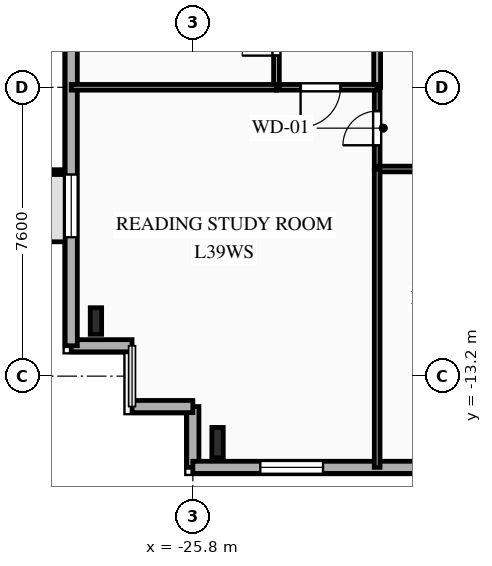
"""IFC4 building model, lengths in metres.
Left out: names, types, materials, properties, quantities, classifications, styles, units other than length and angle.
Written with IfcOpenShell. Run it as: python <this file> out.ifc"""

import sys

from ifc_helpers import new_model, si_unit, direction, frame, frame_2d, origin, origin_2d, place, context, subcontext, project, spatial, rectangle, i_section, extrude, element, fill, save


model = new_model("IFC4")
c1 = context("Model", 3, precision=1e-05, world=origin(), true_north=direction((0.0, 1.0)))
c2 = subcontext(c1, "Body", "Model", "MODEL_VIEW")
j1 = project(units=[si_unit("LENGTHUNIT", "METRE"), si_unit("PLANEANGLEUNIT", "RADIAN")], contexts=[c1])
p1 = place(None, origin())
s1 = spatial("IfcSite", under=j1, at=p1, CompositionType="ELEMENT")
p2 = place(p1, origin())
s2 = spatial("IfcBuilding", under=s1, at=p2, CompositionType="ELEMENT")
p3 = place(p2, frame((0.0, 0.0, 141.05)))
s3 = spatial("IfcBuildingStorey", under=s2, at=p3, CompositionType="ELEMENT", Elevation=141.05)
p4 = place(p3, frame((-25.15, -14.95, 0.0), z_axis=(0.0, 0.0, 1.0), x_axis=(1.0, 0.0, 0.0)))
e1 = element("IfcColumn", 1, at=p4, inside=s3, PredefinedType="COLUMN", context=c2, shape_type="SweptSolid", body=[
    extrude(i_section(OverallWidth=0.3, OverallDepth=0.8, WebThickness=0.018, FlangeThickness=0.033, FilletRadius=0.03, at=origin_2d()), origin(), (0.0, 0.0, 1.0), 3.35),
])
p5 = place(p3, frame((-28.35, -11.75, 0.0), z_axis=(0.0, 0.0, 1.0), x_axis=(1.0, 0.0, 0.0)))
e2 = element("IfcColumn", 2, at=p5, inside=s3, PredefinedType="COLUMN", context=c2, shape_type="SweptSolid", body=[
    extrude(i_section(OverallWidth=0.3, OverallDepth=0.7, WebThickness=0.017, FlangeThickness=0.032, FilletRadius=0.027, at=origin_2d()), origin(), (0.0, 0.0, 1.0), 3.35),
])
p6 = place(p3, frame((-25.8, -15.6, 0.0), z_axis=(0.0, 0.0, 1.0), x_axis=(0.0, 1.0, 0.0)))
e3 = element("IfcWall", 3, at=p6, inside=s3, PredefinedType="SOLIDWALL", context=c2, shape_type="SweptSolid", body=[
    extrude(rectangle(XDim=1.6, YDim=0.32, at=frame_2d((0.8, 0.0))), origin(), (0.0, 0.0, 1.0), 3.04),
])
p7 = place(p3, frame((-25.8, -14.0, 0.0), z_axis=(0.0, 0.0, 1.0), x_axis=(-1.0, 0.0, 0.0)))
e4 = element("IfcWall", 4, at=p7, inside=s3, PredefinedType="SOLIDWALL", context=c2, shape_type="SweptSolid", body=[
    extrude(rectangle(XDim=1.6, YDim=0.32, at=frame_2d((0.8, 0.0))), origin(), (0.0, 0.0, 1.0), 3.04),
])
p8 = place(p3, frame((-27.4, -12.4, 0.0), z_axis=(0.0, 0.0, 1.0), x_axis=(-1.0, 0.0, 0.0)))
e5 = element("IfcWall", 5, at=p8, inside=s3, PredefinedType="SOLIDWALL", context=c2, shape_type="SweptSolid", body=[
    extrude(rectangle(XDim=1.6, YDim=0.32, at=frame_2d((0.8, 0.0))), origin(), (0.0, 0.0, 1.0), 3.04),
])
p9 = place(p3, frame((-29.0, -12.4, 0.0), z_axis=(0.0, 0.0, 1.0), x_axis=(0.0, 1.0, 0.0)))
e6 = element("IfcWall", 6, at=p9, inside=s3, PredefinedType="SOLIDWALL", context=c2, shape_type="SweptSolid", body=[
    extrude(rectangle(XDim=29.6, YDim=0.32, at=frame_2d((14.8, 0.0))), origin(), (0.0, 0.0, 1.0), 3.04),
])
p10 = place(p9, frame((2.855, 0.0, 0.85)))
e7 = element("IfcOpeningElement", 7, at=p10, cuts=e6, PredefinedType="OPENING", context=c2, shape_type="SweptSolid", body=[
    extrude(rectangle(XDim=1.65, YDim=1.85, at=frame_2d((0.825, 0.925))), frame((0.0, 0.17, 0.0), z_axis=(0.0, -1.0, 0.0), x_axis=(1.0, 0.0, 0.0)), (0.0, 0.0, 1.0), 0.34),
])
p11 = place(p9, frame((9.865, 0.0, 0.85)))
e8 = element("IfcOpeningElement", 8, at=p11, cuts=e6, PredefinedType="OPENING", context=c2, shape_type="SweptSolid", body=[
    extrude(rectangle(XDim=1.95, YDim=1.85, at=frame_2d((0.975, 0.925))), frame((0.0, 0.17, 0.0), z_axis=(0.0, -1.0, 0.0), x_axis=(1.0, 0.0, 0.0)), (0.0, 0.0, 1.0), 0.34),
])
p12 = place(p9, frame((13.08, 0.0, 0.85)))
e9 = element("IfcOpeningElement", 9, at=p12, cuts=e6, PredefinedType="OPENING", context=c2, shape_type="SweptSolid", body=[
    extrude(rectangle(XDim=1.6, YDim=1.85, at=frame_2d((0.8, 0.925))), frame((0.0, 0.17, 0.0), z_axis=(0.0, -1.0, 0.0), x_axis=(1.0, 0.0, 0.0)), (0.0, 0.0, 1.0), 0.34),
])
p13 = place(p9, frame((15.88, 0.0, 0.85)))
e10 = element("IfcOpeningElement", 10, at=p13, cuts=e6, PredefinedType="OPENING", context=c2, shape_type="SweptSolid", body=[
    extrude(rectangle(XDim=1.6, YDim=1.85, at=frame_2d((0.8, 0.925))), frame((0.0, 0.17, 0.0), z_axis=(0.0, -1.0, 0.0), x_axis=(1.0, 0.0, 0.0)), (0.0, 0.0, 1.0), 0.34),
])
p14 = place(p9, frame((18.72, 0.0, 0.85)))
e11 = element("IfcOpeningElement", 11, at=p14, cuts=e6, PredefinedType="OPENING", context=c2, shape_type="SweptSolid", body=[
    extrude(rectangle(XDim=1.6, YDim=1.85, at=frame_2d((0.8, 0.925))), frame((0.0, 0.17, 0.0), z_axis=(0.0, -1.0, 0.0), x_axis=(1.0, 0.0, 0.0)), (0.0, 0.0, 1.0), 0.34),
])
p15 = place(p9, frame((24.255, 0.0, 0.85)))
e12 = element("IfcOpeningElement", 12, at=p15, cuts=e6, PredefinedType="OPENING", context=c2, shape_type="SweptSolid", body=[
    extrude(rectangle(XDim=1.65, YDim=1.85, at=frame_2d((0.825, 0.925))), frame((0.0, 0.17, 0.0), z_axis=(0.0, -1.0, 0.0), x_axis=(1.0, 0.0, 0.0)), (0.0, 0.0, 1.0), 0.34),
])
p16 = place(p3, frame((23.8, -15.6, 0.0), z_axis=(0.0, 0.0, 1.0), x_axis=(-1.0, 0.0, 0.0)))
e13 = element("IfcWall", 13, at=p16, inside=s3, PredefinedType="SOLIDWALL", context=c2, shape_type="SweptSolid", body=[
    extrude(rectangle(XDim=49.6, YDim=0.32, at=frame_2d((24.8, 0.0))), origin(), (0.0, 0.0, 1.0), 3.04),
])
p17 = place(p16, frame((1.13, 0.0, 0.85)))
e14 = element("IfcOpeningElement", 14, at=p17, cuts=e13, PredefinedType="OPENING", context=c2, shape_type="SweptSolid", body=[
    extrude(rectangle(XDim=1.1, YDim=1.85, at=frame_2d((0.55, 0.925))), frame((0.0, 0.17, 0.0), z_axis=(0.0, -1.0, 0.0), x_axis=(1.0, 0.0, 0.0)), (0.0, 0.0, 1.0), 0.34),
])
p18 = place(p16, frame((6.495, 0.0, 0.85)))
e15 = element("IfcOpeningElement", 15, at=p18, cuts=e13, PredefinedType="OPENING", context=c2, shape_type="SweptSolid", body=[
    extrude(rectangle(XDim=1.65, YDim=1.85, at=frame_2d((0.825, 0.925))), frame((0.0, 0.17, 0.0), z_axis=(0.0, -1.0, 0.0), x_axis=(1.0, 0.0, 0.0)), (0.0, 0.0, 1.0), 0.34),
])
p19 = place(p16, frame((13.996, 0.0, 0.85)))
e16 = element("IfcOpeningElement", 16, at=p19, cuts=e13, PredefinedType="OPENING", context=c2, shape_type="SweptSolid", body=[
    extrude(rectangle(XDim=2.2, YDim=1.85, at=frame_2d((1.1, 0.925))), frame((0.0, 0.17, 0.0), z_axis=(0.0, -1.0, 0.0), x_axis=(1.0, 0.0, 0.0)), (0.0, 0.0, 1.0), 0.34),
])
p20 = place(p16, frame((22.396, 0.0, 0.85)))
e17 = element("IfcOpeningElement", 17, at=p20, cuts=e13, PredefinedType="OPENING", context=c2, shape_type="SweptSolid", body=[
    extrude(rectangle(XDim=2.2, YDim=1.85, at=frame_2d((1.1, 0.925))), frame((0.0, 0.17, 0.0), z_axis=(0.0, -1.0, 0.0), x_axis=(1.0, 0.0, 0.0)), (0.0, 0.0, 1.0), 0.34),
])
p21 = place(p16, frame((30.2, 0.0, 0.85)))
e18 = element("IfcOpeningElement", 18, at=p21, cuts=e13, PredefinedType="OPENING", context=c2, shape_type="SweptSolid", body=[
    extrude(rectangle(XDim=2.2, YDim=1.85, at=frame_2d((1.1, 0.925))), frame((0.0, 0.17, 0.0), z_axis=(0.0, -1.0, 0.0), x_axis=(1.0, 0.0, 0.0)), (0.0, 0.0, 1.0), 0.34),
])
p22 = place(p16, frame((38.673, 0.0, 0.85)))
e19 = element("IfcOpeningElement", 19, at=p22, cuts=e13, PredefinedType="OPENING", context=c2, shape_type="SweptSolid", body=[
    extrude(rectangle(XDim=1.65, YDim=1.85, at=frame_2d((0.825, 0.925))), frame((0.0, 0.17, 0.0), z_axis=(0.0, -1.0, 0.0), x_axis=(1.0, 0.0, 0.0)), (0.0, 0.0, 1.0), 0.34),
])
p23 = place(p16, frame((46.175, 0.0, 0.85)))
e20 = element("IfcOpeningElement", 20, at=p23, cuts=e13, PredefinedType="OPENING", context=c2, shape_type="SweptSolid", body=[
    extrude(rectangle(XDim=1.65, YDim=1.85, at=frame_2d((0.825, 0.925))), frame((0.0, 0.17, 0.0), z_axis=(0.0, -1.0, 0.0), x_axis=(1.0, 0.0, 0.0)), (0.0, 0.0, 1.0), 0.34),
])
p24 = place(p3, frame((-20.95, -7.75, 0.0), z_axis=(0.0, 0.0, 1.0), x_axis=(0.0, 1.0, 0.0)))
e21 = element("IfcWall", 21, at=p24, inside=s3, PredefinedType="PARTITIONING", context=c2, shape_type="SweptSolid", body=[
    extrude(rectangle(XDim=2.15, YDim=0.15, at=frame_2d((1.075, 0.0))), origin(), (0.0, 0.0, 1.0), 3.04),
])
p25 = place(p24, frame((0.625, 0.0, 0.0)))
e22 = element("IfcOpeningElement", 22, at=p25, cuts=e21, PredefinedType="OPENING", context=c2, shape_type="SweptSolid", body=[
    extrude(rectangle(XDim=0.9, YDim=2.1, at=frame_2d((0.45, 1.05))), frame((0.0, 0.085, 0.0), z_axis=(0.0, -1.0, 0.0), x_axis=(1.0, 0.0, 0.0)), (0.0, 0.0, 1.0), 0.17),
])
p26 = place(p3, frame((-13.07, -7.75, 0.0), z_axis=(0.0, 0.0, 1.0), x_axis=(-1.0, 0.0, 0.0)))
e23 = element("IfcWall", 23, at=p26, inside=s3, PredefinedType="PARTITIONING", context=c2, shape_type="SweptSolid", body=[
    extrude(rectangle(XDim=7.88, YDim=0.15, at=frame_2d((3.94, 0.0))), origin(), (0.0, 0.0, 1.0), 3.04),
])
p27 = place(p26, frame((1.289, 0.0, 0.0)))
e24 = element("IfcOpeningElement", 24, at=p27, cuts=e23, PredefinedType="OPENING", context=c2, shape_type="SweptSolid", body=[
    extrude(rectangle(XDim=1.05, YDim=2.15, at=frame_2d((0.525, 1.075))), frame((0.0, 0.085, 0.0), z_axis=(0.0, -1.0, 0.0), x_axis=(1.0, 0.0, 0.0)), (0.0, 0.0, 1.0), 0.17),
])
p28 = place(p3, frame((-20.95, -5.6, 0.0), z_axis=(0.0, 0.0, 1.0), x_axis=(0.0, 1.0, 0.0)))
e25 = element("IfcWall", 25, at=p28, inside=s3, PredefinedType="PARTITIONING", context=c2, shape_type="SweptSolid", body=[
    extrude(rectangle(XDim=14.1, YDim=0.18, at=frame_2d((7.05, 0.0))), origin(), (0.0, 0.0, 1.0), 3.04),
])
p29 = place(p28, frame((5.058, 0.0, 0.0)))
e26 = element("IfcOpeningElement", 26, at=p29, cuts=e25, PredefinedType="OPENING", context=c2, shape_type="SweptSolid", body=[
    extrude(rectangle(XDim=1.0, YDim=2.15, at=frame_2d((0.5, 1.075))), frame((0.0, 0.1, 0.0), z_axis=(0.0, -1.0, 0.0), x_axis=(1.0, 0.0, 0.0)), (0.0, 0.0, 1.0), 0.2),
])
p30 = place(p3, frame((-20.95, -5.6, 0.0), z_axis=(0.0, 0.0, 1.0), x_axis=(-1.0, 0.0, 0.0)))
e27 = element("IfcWall", 27, at=p30, inside=s3, PredefinedType="PARTITIONING", context=c2, shape_type="SweptSolid", body=[
    extrude(rectangle(XDim=2.65, YDim=0.15, at=frame_2d((1.325, 0.0))), origin(), (0.0, 0.0, 1.0), 3.04),
])
p31 = place(p30, frame((0.965, 0.0, 0.0)))
e28 = element("IfcOpeningElement", 28, at=p31, cuts=e27, PredefinedType="OPENING", context=c2, shape_type="SweptSolid", body=[
    extrude(rectangle(XDim=1.05, YDim=2.15, at=frame_2d((0.525, 1.075))), frame((0.0, 0.085, 0.0), z_axis=(0.0, -1.0, 0.0), x_axis=(1.0, 0.0, 0.0)), (0.0, 0.0, 1.0), 0.17),
])
p32 = place(p3, frame((-23.6, -5.6, 0.0), z_axis=(0.0, 0.0, 1.0), x_axis=(0.0, 1.0, 0.0)))
e29 = element("IfcWall", 29, at=p32, inside=s3, PredefinedType="PLUMBINGWALL", context=c2, shape_type="SweptSolid", body=[
    extrude(rectangle(XDim=2.35, YDim=0.15, at=frame_2d((1.175, 0.0))), origin(), (0.0, 0.0, 1.0), 2.695),
])
p33 = place(p32, frame((0.834, 0.0, 0.0)))
e30 = element("IfcOpeningElement", 30, at=p33, cuts=e29, PredefinedType="OPENING", context=c2, shape_type="SweptSolid", body=[
    extrude(rectangle(XDim=0.9, YDim=2.1, at=frame_2d((0.45, 1.05))), frame((0.0, 0.085, 0.0), z_axis=(0.0, -1.0, 0.0), x_axis=(1.0, 0.0, 0.0)), (0.0, 0.0, 1.0), 0.17),
])
p34 = place(p3, frame((-29.0, -5.6, 0.0), z_axis=(0.0, 0.0, 1.0), x_axis=(1.0, 0.0, 0.0)))
e31 = element("IfcWall", 31, at=p34, inside=s3, PredefinedType="PLUMBINGWALL", context=c2, shape_type="SweptSolid", body=[
    extrude(rectangle(XDim=5.4, YDim=0.15, at=frame_2d((2.7, 0.0))), origin(), (0.0, 0.0, 1.0), 3.04),
])
p35 = place(p3, frame((-20.95, -7.75, 0.0), z_axis=(0.0, 0.0, 1.0), x_axis=(0.0, -1.0, 0.0)))
e32 = element("IfcWall", 32, at=p35, inside=s3, PredefinedType="PARTITIONING", context=c2, shape_type="SweptSolid", body=[
    extrude(rectangle(XDim=7.85, YDim=0.15, at=frame_2d((3.925, 0.0))), origin(), (0.0, 0.0, 1.0), 3.04),
])
p36 = place(p10, origin())
e33 = element("IfcWindow", 33, at=p36, inside=s3, PartitioningType="SINGLE_PANEL", PredefinedType="WINDOW", context=c2, shape_type="SweptSolid", body=[
    extrude(rectangle(XDim=1.65, YDim=1.85, at=frame_2d((0.825, 0.925))), frame((0.0, 0.03, 0.0), z_axis=(0.0, -1.0, 0.0), x_axis=(1.0, 0.0, 0.0)), (0.0, 0.0, 1.0), 0.06),
])
fill(e7, e33)
p37 = place(p23, origin())
e34 = element("IfcWindow", 34, at=p37, inside=s3, PartitioningType="SINGLE_PANEL", PredefinedType="WINDOW", context=c2, shape_type="SweptSolid", body=[
    extrude(rectangle(XDim=1.65, YDim=1.85, at=frame_2d((0.825, 0.925))), frame((0.0, 0.03, 0.0), z_axis=(0.0, -1.0, 0.0), x_axis=(1.0, 0.0, 0.0)), (0.0, 0.0, 1.0), 0.06),
])
fill(e20, e34)
p38 = place(p25, origin())
e35 = element("IfcDoor", 35, at=p38, inside=s3, OperationType="SINGLE_SWING_LEFT", PredefinedType="DOOR", context=c2, shape_type="SweptSolid", body=[
    extrude(rectangle(XDim=0.9, YDim=2.1, at=frame_2d((0.45, 1.05))), frame((0.0, 0.025, 0.0), z_axis=(0.0, -1.0, 0.0), x_axis=(1.0, 0.0, 0.0)), (0.0, 0.0, 1.0), 0.05),
])
fill(e22, e35)
p39 = place(p31, origin())
e36 = element("IfcDoor", 36, at=p39, inside=s3, OperationType="SINGLE_SWING_RIGHT", PredefinedType="DOOR", context=c2, shape_type="SweptSolid", body=[
    extrude(rectangle(XDim=1.05, YDim=2.15, at=frame_2d((0.525, 1.075))), frame((0.0, 0.025, 0.0), z_axis=(0.0, -1.0, 0.0), x_axis=(1.0, 0.0, 0.0)), (0.0, 0.0, 1.0), 0.05),
])
fill(e28, e36)
p40 = place(p33, origin())
e37 = element("IfcDoor", 37, at=p40, inside=s3, OperationType="SINGLE_SWING_LEFT", PredefinedType="DOOR", context=c2, shape_type="SweptSolid", body=[
    extrude(rectangle(XDim=0.9, YDim=2.1, at=frame_2d((0.45, 1.05))), frame((0.0, 0.025, 0.0), z_axis=(0.0, -1.0, 0.0), x_axis=(1.0, 0.0, 0.0)), (0.0, 0.0, 1.0), 0.05),
])
fill(e30, e37)
save(model, sys.argv[1])
